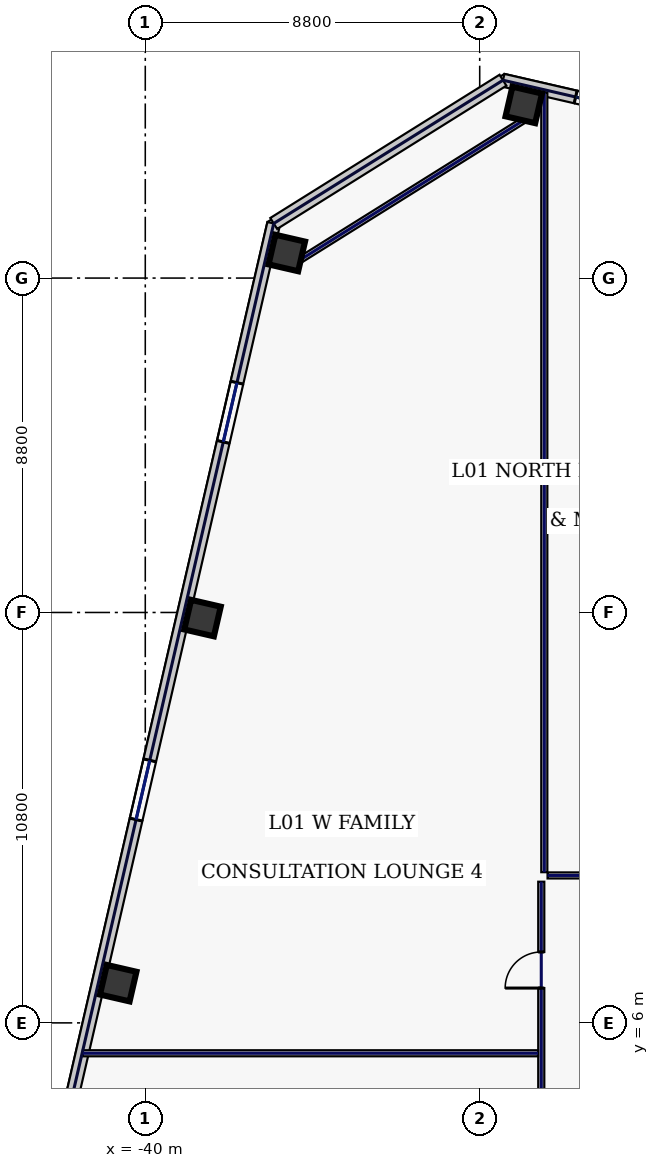
"""IFC4 building model, lengths in metres.
Left out: names, types, materials, properties, quantities, classifications, styles, units other than length and angle.
Written with IfcOpenShell. Run it as: python <this file> out.ifc"""

import sys

from ifc_helpers import new_model, si_unit, direction, frame, frame_2d, origin, origin_2d, place, context, subcontext, project, spatial, rectangle, hollow_rectangle, extrude, element, fill, save


model = new_model("IFC4")
c1 = context("Model", 3, precision=1e-05, world=origin(), true_north=direction((0.0, 1.0)))
c2 = subcontext(c1, "Body", "Model", "MODEL_VIEW")
j1 = project(units=[si_unit("LENGTHUNIT", "METRE"), si_unit("PLANEANGLEUNIT", "RADIAN")], contexts=[c1])
p1 = place(None, origin())
s1 = spatial("IfcSite", under=j1, at=p1, CompositionType="ELEMENT")
p2 = place(p1, origin())
s2 = spatial("IfcBuilding", under=s1, at=p2, CompositionType="ELEMENT")
p3 = place(p2, frame((0.0, 0.0, 8.4)))
s3 = spatial("IfcBuildingStorey", under=s2, at=p3, CompositionType="ELEMENT", Elevation=8.4)
for number, where, z_axis, x_axis in (
    (1, (-30.04, 30.156, 0.0), (0.0, 0.0, 1.0), (0.974, -0.225, 0.0)),
    (2, (-36.276, 26.26, 0.0), (0.0, 0.0, 1.0), (0.974, -0.225, 0.0)),
    (3, (-38.494, 16.652, 0.0), (0.0, 0.0, 1.0), (0.974, -0.225, 0.0)),
    (4, (-40.712, 7.045, 0.0), (0.0, 0.0, 1.0), (0.974, -0.225, 0.0)),
):
    element("IfcColumn", number, at=place(p3, frame(where, z_axis=z_axis, x_axis=x_axis)), inside=s3, PredefinedType="COLUMN", context=c2, shape_type="SweptSolid", body=[
        extrude(hollow_rectangle(XDim=0.8, YDim=0.8, WallThickness=0.036, at=origin_2d()), origin(), (0.0, 0.0, 1.0), 4.7),
    ])
p4 = place(p3, frame((-8.517, 25.711, 0.0), z_axis=(0.0, 0.0, 1.0), x_axis=(-0.974372845456, 0.224939009598, 0.0)))
e5 = element("IfcWall", 5, at=p4, inside=s3, PredefinedType="STANDARD", context=c2, shape_type="SweptSolid", body=[
    extrude(rectangle(XDim=22.652, YDim=0.34, at=frame_2d((11.326, 0.0))), origin(), (0.0, 0.0, 1.0), 4.7),
])
p5 = place(p4, frame((17.989, 0.0, 0.9)))
e6 = element("IfcOpeningElement", 6, at=p5, cuts=e5, PredefinedType="OPENING", context=c2, shape_type="SweptSolid", body=[
    extrude(rectangle(XDim=2.7, YDim=2.2, at=frame_2d((1.35, 1.1))), frame((0.0, 0.18, 0.0), z_axis=(0.0, -1.0, 0.0), x_axis=(1.0, 0.0, 0.0)), (0.0, 0.0, 1.0), 0.36),
])
p6 = place(p4, frame((14.055, 0.0, 0.22)))
e7 = element("IfcOpeningElement", 7, at=p6, cuts=e5, PredefinedType="OPENING", context=c2, shape_type="SweptSolid", body=[
    extrude(rectangle(XDim=1.6, YDim=1.2, at=frame_2d((0.8, 0.6))), frame((0.0, 0.18, 0.0), z_axis=(0.0, -1.0, 0.0), x_axis=(1.0, 0.0, 0.0)), (0.0, 0.0, 1.0), 0.36),
])
p7 = place(p4, frame((8.241, 0.0, 0.9)))
e8 = element("IfcOpeningElement", 8, at=p7, cuts=e5, PredefinedType="OPENING", context=c2, shape_type="SweptSolid", body=[
    extrude(rectangle(XDim=2.7, YDim=2.2, at=frame_2d((1.35, 1.1))), frame((0.0, 0.18, 0.0), z_axis=(0.0, -1.0, 0.0), x_axis=(1.0, 0.0, 0.0)), (0.0, 0.0, 1.0), 0.36),
])
p8 = place(p4, frame((3.756, 0.0, 0.9)))
e9 = element("IfcOpeningElement", 9, at=p8, cuts=e5, PredefinedType="OPENING", context=c2, shape_type="SweptSolid", body=[
    extrude(rectangle(XDim=0.85, YDim=1.85, at=frame_2d((0.425, 0.925))), frame((0.0, 0.18, 0.0), z_axis=(0.0, -1.0, 0.0), x_axis=(1.0, 0.0, 0.0)), (0.0, 0.0, 1.0), 0.36),
])
p9 = place(p3, frame((-36.62, 27.037, 0.0), z_axis=(0.0, 0.0, 1.0), x_axis=(-0.224951280646, -0.974370012539, 0.0)))
e10 = element("IfcWall", 10, at=p9, inside=s3, PredefinedType="STANDARD", context=c2, shape_type="SweptSolid", body=[
    extrude(rectangle(XDim=40.8, YDim=0.34, at=frame_2d((20.4, 0.0))), origin(), (0.0, 0.0, 1.0), 4.7),
])
p10 = place(p9, frame((4.3, 0.0, 0.58)))
e11 = element("IfcOpeningElement", 11, at=p10, cuts=e10, PredefinedType="OPENING", context=c2, shape_type="SweptSolid", body=[
    extrude(rectangle(XDim=1.6, YDim=2.3, at=frame_2d((0.8, 1.15))), frame((0.0, 0.18, 0.0), z_axis=(0.0, -1.0, 0.0), x_axis=(1.0, 0.0, 0.0)), (0.0, 0.0, 1.0), 0.36),
])
p11 = place(p9, frame((14.5, 0.0, 0.58)))
e12 = element("IfcOpeningElement", 12, at=p11, cuts=e10, PredefinedType="OPENING", context=c2, shape_type="SweptSolid", body=[
    extrude(rectangle(XDim=1.6, YDim=2.3, at=frame_2d((0.8, 1.15))), frame((0.0, 0.18, 0.0), z_axis=(0.0, -1.0, 0.0), x_axis=(1.0, 0.0, 0.0)), (0.0, 0.0, 1.0), 0.36),
])
p12 = place(p9, frame((24.7, 0.0, 0.58)))
e13 = element("IfcOpeningElement", 13, at=p12, cuts=e10, PredefinedType="OPENING", context=c2, shape_type="SweptSolid", body=[
    extrude(rectangle(XDim=1.6, YDim=2.3, at=frame_2d((0.8, 1.15))), frame((0.0, 0.18, 0.0), z_axis=(0.0, -1.0, 0.0), x_axis=(1.0, 0.0, 0.0)), (0.0, 0.0, 1.0), 0.36),
])
p13 = place(p9, frame((34.9, 0.0, 0.58)))
e14 = element("IfcOpeningElement", 14, at=p13, cuts=e10, PredefinedType="OPENING", context=c2, shape_type="SweptSolid", body=[
    extrude(rectangle(XDim=1.6, YDim=2.3, at=frame_2d((0.8, 1.15))), frame((0.0, 0.18, 0.0), z_axis=(0.0, -1.0, 0.0), x_axis=(1.0, 0.0, 0.0)), (0.0, 0.0, 1.0), 0.36),
])
p14 = place(p3, frame((-30.588, 30.807, 0.0), z_axis=(0.0, 0.0, 1.0), x_axis=(-0.848031080615, -0.529946493819, 0.0)))
e15 = element("IfcWall", 15, at=p14, inside=s3, PredefinedType="STANDARD", context=c2, shape_type="SweptSolid", body=[
    extrude(rectangle(XDim=7.114, YDim=0.34, at=frame_2d((3.557, 0.0))), origin(), (0.0, 0.0, 1.0), 4.7),
])
p15 = place(p3, frame((-29.86, 29.868, 0.0), z_axis=(0.0, 0.0, 1.0), x_axis=(-0.848043064089, -0.529927317139, 0.0)))
e16 = element("IfcWall", 16, at=p15, inside=s3, PredefinedType="PARTITIONING", context=c2, shape_type="SweptSolid", body=[
    extrude(rectangle(XDim=7.354, YDim=0.16, at=frame_2d((3.677, 0.0))), origin(), (0.0, 0.0, 1.0), 4.7),
])
p16 = place(p3, frame((-29.58, -9.715, 0.0), z_axis=(0.0, 0.0, 1.0), x_axis=(0.0, 1.0, 0.0)))
e17 = element("IfcWall", 17, at=p16, inside=s3, PredefinedType="PARTITIONING", context=c2, shape_type="SweptSolid", body=[
    extrude(rectangle(XDim=19.43, YDim=0.16, at=frame_2d((9.715, 0.0))), origin(), (0.0, 0.0, 1.0), 4.7),
])
p17 = place(p16, frame((2.019, 0.0, 0.0)))
e18 = element("IfcOpeningElement", 18, at=p17, cuts=e17, PredefinedType="OPENING", context=c2, shape_type="SweptSolid", body=[
    extrude(rectangle(XDim=0.95, YDim=2.2, at=frame_2d((0.475, 1.1))), frame((0.0, 0.09, 0.0), z_axis=(0.0, -1.0, 0.0), x_axis=(1.0, 0.0, 0.0)), (0.0, 0.0, 1.0), 0.18),
])
p18 = place(p16, frame((6.1, 0.0, 0.0)))
e19 = element("IfcOpeningElement", 19, at=p18, cuts=e17, PredefinedType="OPENING", context=c2, shape_type="SweptSolid", body=[
    extrude(rectangle(XDim=0.95, YDim=2.2, at=frame_2d((0.475, 1.1))), frame((0.0, 0.09, 0.0), z_axis=(0.0, -1.0, 0.0), x_axis=(1.0, 0.0, 0.0)), (0.0, 0.0, 1.0), 0.18),
])
p19 = place(p16, frame((11.3, 0.0, 0.0)))
e20 = element("IfcOpeningElement", 20, at=p19, cuts=e17, PredefinedType="OPENING", context=c2, shape_type="SweptSolid", body=[
    extrude(rectangle(XDim=0.95, YDim=2.2, at=frame_2d((0.475, 1.1))), frame((0.0, 0.09, 0.0), z_axis=(0.0, -1.0, 0.0), x_axis=(1.0, 0.0, 0.0)), (0.0, 0.0, 1.0), 0.18),
])
p20 = place(p16, frame((16.631, 0.0, 0.0)))
e21 = element("IfcOpeningElement", 21, at=p20, cuts=e17, PredefinedType="OPENING", context=c2, shape_type="SweptSolid", body=[
    extrude(rectangle(XDim=0.95, YDim=2.2, at=frame_2d((0.475, 1.1))), frame((0.0, 0.09, 0.0), z_axis=(0.0, -1.0, 0.0), x_axis=(1.0, 0.0, 0.0)), (0.0, 0.0, 1.0), 0.18),
])
p21 = place(p3, frame((-29.415, 9.88, 0.0), z_axis=(0.0, 0.0, 1.0), x_axis=(1.0, 0.0, 0.0)))
e22 = element("IfcWall", 22, at=p21, inside=s3, PredefinedType="PARTITIONING", context=c2, shape_type="SweptSolid", body=[
    extrude(rectangle(XDim=58.83, YDim=0.16, at=frame_2d((29.415, 0.0))), origin(), (0.0, 0.0, 1.0), 4.7),
])
p22 = place(p21, frame((2.044, 0.0, 0.0)))
e23 = element("IfcOpeningElement", 23, at=p22, cuts=e22, PredefinedType="OPENING", context=c2, shape_type="SweptSolid", body=[
    extrude(rectangle(XDim=1.15, YDim=2.2, at=frame_2d((0.575, 1.1))), frame((0.0, 0.09, 0.0), z_axis=(0.0, -1.0, 0.0), x_axis=(1.0, 0.0, 0.0)), (0.0, 0.0, 1.0), 0.18),
])
p23 = place(p21, frame((6.3, 0.0, 0.0)))
e24 = element("IfcOpeningElement", 24, at=p23, cuts=e22, PredefinedType="OPENING", context=c2, shape_type="SweptSolid", body=[
    extrude(rectangle(XDim=1.05, YDim=2.2, at=frame_2d((0.525, 1.1))), frame((0.0, 0.09, 0.0), z_axis=(0.0, -1.0, 0.0), x_axis=(1.0, 0.0, 0.0)), (0.0, 0.0, 1.0), 0.18),
])
p24 = place(p21, frame((11.775, 0.0, 0.0)))
e25 = element("IfcOpeningElement", 25, at=p24, cuts=e22, PredefinedType="OPENING", context=c2, shape_type="SweptSolid", body=[
    extrude(rectangle(XDim=0.95, YDim=2.2, at=frame_2d((0.475, 1.1))), frame((0.0, 0.09, 0.0), z_axis=(0.0, -1.0, 0.0), x_axis=(1.0, 0.0, 0.0)), (0.0, 0.0, 1.0), 0.18),
])
p25 = place(p21, frame((18.975, 0.0, 0.0)))
e26 = element("IfcOpeningElement", 26, at=p25, cuts=e22, PredefinedType="OPENING", context=c2, shape_type="SweptSolid", body=[
    extrude(rectangle(XDim=0.95, YDim=2.2, at=frame_2d((0.475, 1.1))), frame((0.0, 0.09, 0.0), z_axis=(0.0, -1.0, 0.0), x_axis=(1.0, 0.0, 0.0)), (0.0, 0.0, 1.0), 0.18),
])
p26 = place(p21, frame((27.125, 0.0, 0.0)))
e27 = element("IfcOpeningElement", 27, at=p26, cuts=e22, PredefinedType="OPENING", context=c2, shape_type="SweptSolid", body=[
    extrude(rectangle(XDim=0.95, YDim=2.2, at=frame_2d((0.475, 1.1))), frame((0.0, 0.09, 0.0), z_axis=(0.0, -1.0, 0.0), x_axis=(1.0, 0.0, 0.0)), (0.0, 0.0, 1.0), 0.18),
])
p27 = place(p21, frame((35.825, 0.0, 0.0)))
e28 = element("IfcOpeningElement", 28, at=p27, cuts=e22, PredefinedType="OPENING", context=c2, shape_type="SweptSolid", body=[
    extrude(rectangle(XDim=0.95, YDim=2.2, at=frame_2d((0.475, 1.1))), frame((0.0, 0.09, 0.0), z_axis=(0.0, -1.0, 0.0), x_axis=(1.0, 0.0, 0.0)), (0.0, 0.0, 1.0), 0.18),
])
p28 = place(p21, frame((44.325, 0.0, 0.0)))
e29 = element("IfcOpeningElement", 29, at=p28, cuts=e22, PredefinedType="OPENING", context=c2, shape_type="SweptSolid", body=[
    extrude(rectangle(XDim=1.05, YDim=2.2, at=frame_2d((0.525, 1.1))), frame((0.0, 0.09, 0.0), z_axis=(0.0, -1.0, 0.0), x_axis=(1.0, 0.0, 0.0)), (0.0, 0.0, 1.0), 0.18),
])
p29 = place(p21, frame((51.15, 0.0, 0.0)))
e30 = element("IfcOpeningElement", 30, at=p29, cuts=e22, PredefinedType="OPENING", context=c2, shape_type="SweptSolid", body=[
    extrude(rectangle(XDim=1.15, YDim=2.2, at=frame_2d((0.575, 1.1))), frame((0.0, 0.09, 0.0), z_axis=(0.0, -1.0, 0.0), x_axis=(1.0, 0.0, 0.0)), (0.0, 0.0, 1.0), 0.18),
])
p30 = place(p21, frame((56.006, 0.0, 0.0)))
e31 = element("IfcOpeningElement", 31, at=p30, cuts=e22, PredefinedType="OPENING", context=c2, shape_type="SweptSolid", body=[
    extrude(rectangle(XDim=0.95, YDim=2.2, at=frame_2d((0.475, 1.1))), frame((0.0, 0.09, 0.0), z_axis=(0.0, -1.0, 0.0), x_axis=(1.0, 0.0, 0.0)), (0.0, 0.0, 1.0), 0.18),
])
p31 = place(p3, frame((-29.5, 9.965, 0.0), z_axis=(0.0, 0.0, 1.0), x_axis=(0.0, 1.0, 0.0)))
e32 = element("IfcWall", 32, at=p31, inside=s3, PredefinedType="PARTITIONING", context=c2, shape_type="SweptSolid", body=[
    extrude(rectangle(XDim=20.519, YDim=0.16, at=frame_2d((10.259, 0.0))), origin(), (0.0, 0.0, 1.0), 4.7),
])
p32 = place(p3, frame((-41.641, 5.2, 0.0), z_axis=(0.0, 0.0, 1.0), x_axis=(1.0, 0.0, 0.0)))
e33 = element("IfcWall", 33, at=p32, inside=s3, PredefinedType="PARTITIONING", context=c2, shape_type="SweptSolid", body=[
    extrude(rectangle(XDim=11.976, YDim=0.16, at=frame_2d((5.988, 0.0))), origin(), (0.0, 0.0, 1.0), 4.7),
])
p33 = place(p5, origin())
e34 = element("IfcWindow", 34, at=p33, inside=s3, PartitioningType="SINGLE_PANEL", PredefinedType="WINDOW", context=c2, shape_type="SweptSolid", body=[
    extrude(rectangle(XDim=2.7, YDim=2.2, at=frame_2d((1.35, 1.1))), frame((0.0, 0.03, 0.0), z_axis=(0.0, -1.0, 0.0), x_axis=(1.0, 0.0, 0.0)), (0.0, 0.0, 1.0), 0.06),
])
fill(e6, e34)
p34 = place(p10, origin())
e35 = element("IfcWindow", 35, at=p34, inside=s3, PartitioningType="SINGLE_PANEL", PredefinedType="WINDOW", context=c2, shape_type="SweptSolid", body=[
    extrude(rectangle(XDim=1.6, YDim=2.3, at=frame_2d((0.8, 1.15))), frame((0.0, 0.03, 0.0), z_axis=(0.0, -1.0, 0.0), x_axis=(1.0, 0.0, 0.0)), (0.0, 0.0, 1.0), 0.06),
])
fill(e11, e35)
p35 = place(p11, origin())
e36 = element("IfcWindow", 36, at=p35, inside=s3, PartitioningType="SINGLE_PANEL", PredefinedType="WINDOW", context=c2, shape_type="SweptSolid", body=[
    extrude(rectangle(XDim=1.6, YDim=2.3, at=frame_2d((0.8, 1.15))), frame((0.0, 0.03, 0.0), z_axis=(0.0, -1.0, 0.0), x_axis=(1.0, 0.0, 0.0)), (0.0, 0.0, 1.0), 0.06),
])
fill(e12, e36)
p36 = place(p20, origin())
e37 = element("IfcDoor", 37, at=p36, inside=s3, OperationType="SINGLE_SWING_LEFT", PredefinedType="DOOR", context=c2, shape_type="SweptSolid", body=[
    extrude(rectangle(XDim=0.95, YDim=2.2, at=frame_2d((0.475, 1.1))), frame((0.0, 0.025, 0.0), z_axis=(0.0, -1.0, 0.0), x_axis=(1.0, 0.0, 0.0)), (0.0, 0.0, 1.0), 0.05),
])
fill(e21, e37)
save(model, sys.argv[1])
